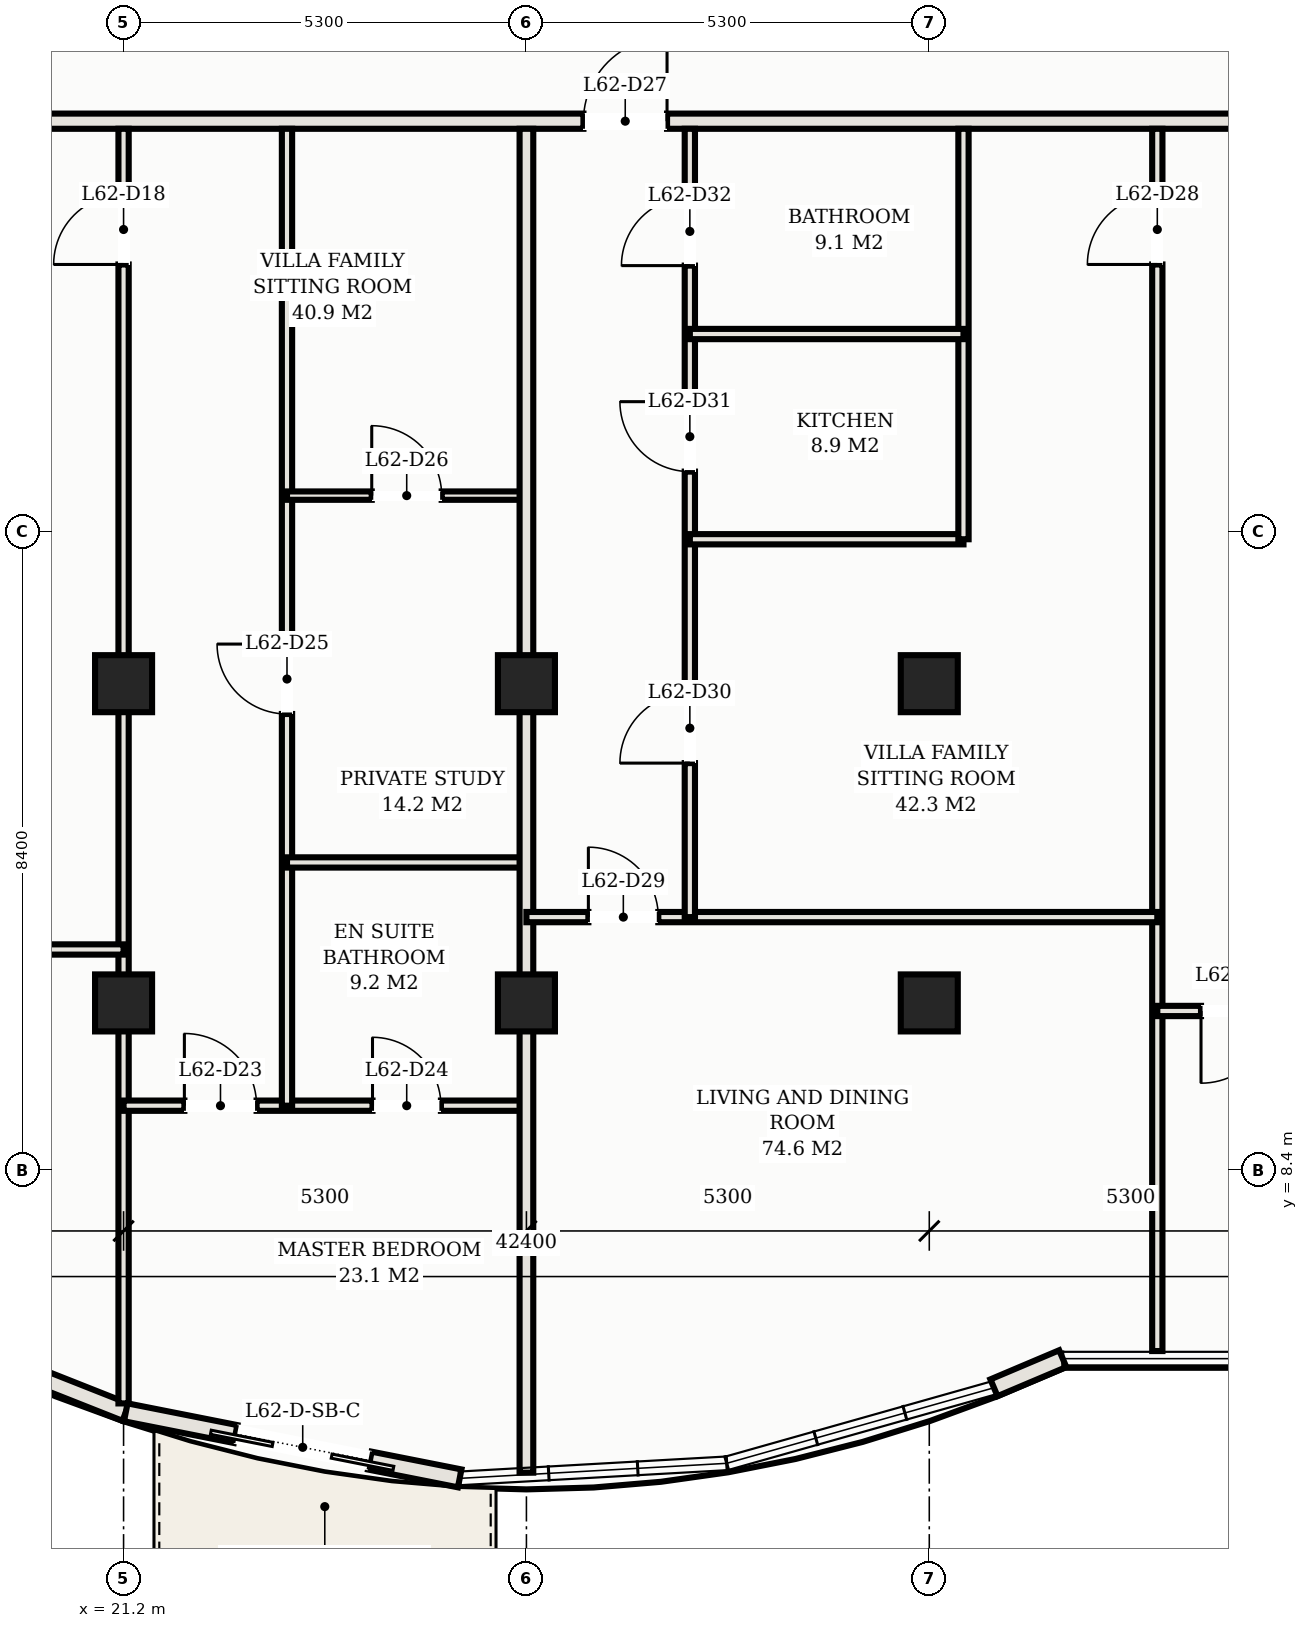
"""IFC4 building model, lengths in metres.
Left out: names, types, materials, properties, quantities, classifications, styles, units other than length and angle.
Written with IfcOpenShell. Run it as: python <this file> out.ifc"""

import sys

from ifc_helpers import new_model, si_unit, direction, frame, frame_2d, origin, origin_2d, place, context, subcontext, project, spatial, rectangle, hollow_rectangle, extrude, element, fill, save


model = new_model("IFC4")
c1 = context("Model", 3, precision=1e-05, world=origin(), true_north=direction((0.0, 1.0)))
c2 = subcontext(c1, "Body", "Model", "MODEL_VIEW")
j1 = project(units=[si_unit("LENGTHUNIT", "METRE"), si_unit("PLANEANGLEUNIT", "RADIAN")], contexts=[c1])
p1 = place(None, origin())
s1 = spatial("IfcSite", under=j1, at=p1, CompositionType="ELEMENT")
p2 = place(p1, origin())
s2 = spatial("IfcBuilding", under=s1, at=p2, CompositionType="ELEMENT")
p3 = place(p2, frame((0.0, 0.0, 226.4)))
s3 = spatial("IfcBuildingStorey", under=s2, at=p3, CompositionType="ELEMENT", Elevation=226.4)
for number, where, z_axis, x_axis in (
    (1, (21.2, 14.8, 0.0), (0.0, 0.0, 1.0), (1.0, 0.0, 0.0)),
    (2, (21.2, 10.6, 0.0), (0.0, 0.0, 1.0), (1.0, 0.0, 0.0)),
    (3, (26.5, 14.8, 0.0), (0.0, 0.0, 1.0), (1.0, 0.0, 0.0)),
    (4, (26.5, 10.6, 0.0), (0.0, 0.0, 1.0), (1.0, 0.0, 0.0)),
    (5, (31.8, 14.8, 0.0), (0.0, 0.0, 1.0), (1.0, 0.0, 0.0)),
    (6, (31.8, 10.6, 0.0), (0.0, 0.0, 1.0), (1.0, 0.0, 0.0)),
):
    element("IfcColumn", number, at=place(p3, frame(where, z_axis=z_axis, x_axis=x_axis)), inside=s3, PredefinedType="COLUMN", context=c2, shape_type="SweptSolid", body=[
        extrude(hollow_rectangle(XDim=0.75, YDim=0.75, WallThickness=0.025, at=origin_2d()), origin(), (0.0, 0.0, 1.0), 3.3),
    ])
p4 = place(p3, frame((19.444, 5.92, 0.0), z_axis=(0.0, 0.0, 1.0), x_axis=(0.92993442177, -0.367725401906, 0.0)))
e7 = element("IfcWall", 7, at=p4, inside=s3, PredefinedType="SOLIDWALL", context=c2, shape_type="SweptSolid", body=[
    extrude(rectangle(XDim=1.919, YDim=0.24, at=frame_2d((0.96, 0.0))), origin(), (0.0, 0.0, 1.0), 3.11),
])
p5 = place(p3, frame((21.229, 5.214, 0.0), z_axis=(0.0, 0.0, 1.0), x_axis=(0.980985349685, -0.194081796425, 0.0)))
e8 = element("IfcWall", 8, at=p5, inside=s3, PredefinedType="SOLIDWALL", context=c2, shape_type="SweptSolid", body=[
    extrude(rectangle(XDim=4.478, YDim=0.24, at=frame_2d((2.239, 0.0))), origin(), (0.0, 0.0, 1.0), 3.11),
])
p6 = place(p5, frame((1.473, 0.0, 0.0)))
e9 = element("IfcOpeningElement", 9, at=p6, cuts=e8, PredefinedType="OPENING", context=c2, shape_type="SweptSolid", body=[
    extrude(rectangle(XDim=1.8, YDim=2.2, at=frame_2d((0.9, 1.1))), frame((0.0, 0.13, 0.0), z_axis=(0.0, -1.0, 0.0), x_axis=(1.0, 0.0, 0.0)), (0.0, 0.0, 1.0), 0.26),
])
p7 = place(p3, frame((32.651, 5.537, 0.0), z_axis=(0.0, 0.0, 1.0), x_axis=(0.920998109395, 0.389567044924, 0.0)))
e10 = element("IfcWall", 10, at=p7, inside=s3, PredefinedType="SOLIDWALL", context=c2, shape_type="SweptSolid", body=[
    extrude(rectangle(XDim=0.983, YDim=0.24, at=frame_2d((0.491, 0.0))), origin(), (0.0, 0.0, 1.0), 3.11),
])
p8 = place(p3, frame((6.72, 22.2, 0.0), z_axis=(0.0, 0.0, 1.0), x_axis=(1.0, 0.0, 0.0)))
e11 = element("IfcWall", 11, at=p8, inside=s3, PredefinedType="PARTITIONING", context=c2, shape_type="SweptSolid", body=[
    extrude(rectangle(XDim=39.56, YDim=0.2, at=frame_2d((19.78, 0.0))), origin(), (0.0, 0.0, 1.0), 2.43),
])
p9 = place(p8, frame((4.63, 0.0, 0.0)))
e12 = element("IfcOpeningElement", 12, at=p9, cuts=e11, PredefinedType="OPENING", context=c2, shape_type="SweptSolid", body=[
    extrude(rectangle(XDim=1.1, YDim=2.25, at=frame_2d((0.55, 1.125))), frame((0.0, 0.11, 0.0), z_axis=(0.0, -1.0, 0.0), x_axis=(1.0, 0.0, 0.0)), (0.0, 0.0, 1.0), 0.22),
])
p10 = place(p8, frame((20.53, 0.0, 0.0)))
e13 = element("IfcOpeningElement", 13, at=p10, cuts=e11, PredefinedType="OPENING", context=c2, shape_type="SweptSolid", body=[
    extrude(rectangle(XDim=1.1, YDim=2.25, at=frame_2d((0.55, 1.125))), frame((0.0, 0.11, 0.0), z_axis=(0.0, -1.0, 0.0), x_axis=(1.0, 0.0, 0.0)), (0.0, 0.0, 1.0), 0.22),
])
p11 = place(p8, frame((1.435, 0.0, 0.0)))
e14 = element("IfcOpeningElement", 14, at=p11, cuts=e11, PredefinedType="OPENING", context=c2, shape_type="SweptSolid", body=[
    extrude(rectangle(XDim=0.92, YDim=2.15, at=frame_2d((0.46, 1.075))), frame((0.0, 0.11, 0.0), z_axis=(0.0, -1.0, 0.0), x_axis=(1.0, 0.0, 0.0)), (0.0, 0.0, 1.0), 0.22),
])
p12 = place(p8, frame((37.205, 0.0, 0.0)))
e15 = element("IfcOpeningElement", 15, at=p12, cuts=e11, PredefinedType="OPENING", context=c2, shape_type="SweptSolid", body=[
    extrude(rectangle(XDim=0.92, YDim=2.15, at=frame_2d((0.46, 1.075))), frame((0.0, 0.11, 0.0), z_axis=(0.0, -1.0, 0.0), x_axis=(1.0, 0.0, 0.0)), (0.0, 0.0, 1.0), 0.22),
])
p13 = place(p3, frame((21.2, 5.331, 0.0), z_axis=(0.0, 0.0, 1.0), x_axis=(0.0, 1.0, 0.0)))
e16 = element("IfcWall", 16, at=p13, inside=s3, PredefinedType="PARTITIONING", context=c2, shape_type="SweptSolid", body=[
    extrude(rectangle(XDim=16.769, YDim=0.135, at=frame_2d((8.385, 0.0))), origin(), (0.0, 0.0, 1.0), 2.43),
])
p14 = place(p13, frame((14.984, 0.0, 0.0)))
e17 = element("IfcOpeningElement", 17, at=p14, cuts=e16, PredefinedType="OPENING", context=c2, shape_type="SweptSolid", body=[
    extrude(rectangle(XDim=0.92, YDim=2.15, at=frame_2d((0.46, 1.075))), frame((0.0, 0.078, 0.0), z_axis=(0.0, -1.0, 0.0), x_axis=(1.0, 0.0, 0.0)), (0.0, 0.0, 1.0), 0.155),
])
p15 = place(p3, frame((10.6, 11.303, 0.0), z_axis=(0.0, 0.0, 1.0), x_axis=(1.0, 0.0, 0.0)))
e18 = element("IfcWall", 18, at=p15, inside=s3, PredefinedType="PARTITIONING", context=c2, shape_type="SweptSolid", body=[
    extrude(rectangle(XDim=10.6, YDim=0.135, at=frame_2d((5.3, 0.0))), origin(), (0.0, 0.0, 1.0), 2.43),
])
p16 = place(p15, frame((0.815, 0.0, 0.0)))
e19 = element("IfcOpeningElement", 19, at=p16, cuts=e18, PredefinedType="OPENING", context=c2, shape_type="SweptSolid", body=[
    extrude(rectangle(XDim=0.92, YDim=2.15, at=frame_2d((0.46, 1.075))), frame((0.0, 0.078, 0.0), z_axis=(0.0, -1.0, 0.0), x_axis=(1.0, 0.0, 0.0)), (0.0, 0.0, 1.0), 0.155),
])
p17 = place(p3, frame((21.2, 9.248, 0.0), z_axis=(0.0, 0.0, 1.0), x_axis=(1.0, 0.0, 0.0)))
e20 = element("IfcWall", 20, at=p17, inside=s3, PredefinedType="PARTITIONING", context=c2, shape_type="SweptSolid", body=[
    extrude(rectangle(XDim=5.3, YDim=0.135, at=frame_2d((2.65, 0.0))), origin(), (0.0, 0.0, 1.0), 2.43),
])
p18 = place(p17, frame((0.8, 0.0, 0.0)))
e21 = element("IfcOpeningElement", 21, at=p18, cuts=e20, PredefinedType="OPENING", context=c2, shape_type="SweptSolid", body=[
    extrude(rectangle(XDim=0.95, YDim=2.15, at=frame_2d((0.475, 1.075))), frame((0.0, 0.078, 0.0), z_axis=(0.0, -1.0, 0.0), x_axis=(1.0, 0.0, 0.0)), (0.0, 0.0, 1.0), 0.155),
])
p19 = place(p17, frame((3.275, 0.0, 0.0)))
e22 = element("IfcOpeningElement", 22, at=p19, cuts=e20, PredefinedType="OPENING", context=c2, shape_type="SweptSolid", body=[
    extrude(rectangle(XDim=0.9, YDim=2.15, at=frame_2d((0.45, 1.075))), frame((0.0, 0.078, 0.0), z_axis=(0.0, -1.0, 0.0), x_axis=(1.0, 0.0, 0.0)), (0.0, 0.0, 1.0), 0.155),
])
p20 = place(p3, frame((23.35, 9.248, 0.0), z_axis=(0.0, 0.0, 1.0), x_axis=(0.0, 1.0, 0.0)))
e23 = element("IfcWall", 23, at=p20, inside=s3, PredefinedType="PARTITIONING", context=c2, shape_type="SweptSolid", body=[
    extrude(rectangle(XDim=12.852, YDim=0.135, at=frame_2d((6.426, 0.0))), origin(), (0.0, 0.0, 1.0), 2.43),
])
p21 = place(p20, frame((5.153, 0.0, 0.0)))
e24 = element("IfcOpeningElement", 24, at=p21, cuts=e23, PredefinedType="OPENING", context=c2, shape_type="SweptSolid", body=[
    extrude(rectangle(XDim=0.92, YDim=2.15, at=frame_2d((0.46, 1.075))), frame((0.0, 0.078, 0.0), z_axis=(0.0, -1.0, 0.0), x_axis=(1.0, 0.0, 0.0)), (0.0, 0.0, 1.0), 0.155),
])
p22 = place(p3, frame((23.35, 12.448, 0.0), z_axis=(0.0, 0.0, 1.0), x_axis=(1.0, 0.0, 0.0)))
e25 = element("IfcWall", 25, at=p22, inside=s3, PredefinedType="PARTITIONING", context=c2, shape_type="SweptSolid", body=[
    extrude(rectangle(XDim=3.15, YDim=0.135, at=frame_2d((1.575, 0.0))), origin(), (0.0, 0.0, 1.0), 2.43),
])
p23 = place(p3, frame((23.35, 17.274, 0.0), z_axis=(0.0, 0.0, 1.0), x_axis=(1.0, 0.0, 0.0)))
e26 = element("IfcWall", 26, at=p23, inside=s3, PredefinedType="MOVABLE", context=c2, shape_type="SweptSolid", body=[
    extrude(rectangle(XDim=3.15, YDim=0.11, at=frame_2d((1.575, 0.0))), origin(), (0.0, 0.0, 1.0), 2.43),
])
p24 = place(p23, frame((1.115, 0.0, 0.0)))
e27 = element("IfcOpeningElement", 27, at=p24, cuts=e26, PredefinedType="OPENING", context=c2, shape_type="SweptSolid", body=[
    extrude(rectangle(XDim=0.92, YDim=2.15, at=frame_2d((0.46, 1.075))), frame((0.0, 0.065, 0.0), z_axis=(0.0, -1.0, 0.0), x_axis=(1.0, 0.0, 0.0)), (0.0, 0.0, 1.0), 0.13),
])
p25 = place(p3, frame((26.5, 4.42, 0.0), z_axis=(0.0, 0.0, 1.0), x_axis=(0.0, 1.0, 0.0)))
e28 = element("IfcWall", 28, at=p25, inside=s3, PredefinedType="PARTITIONING", context=c2, shape_type="SweptSolid", body=[
    extrude(rectangle(XDim=17.68, YDim=0.18, at=frame_2d((8.84, 0.0))), origin(), (0.0, 0.0, 1.0), 2.43),
])
p26 = place(p3, frame((34.8, 6.02, 0.0), z_axis=(0.0, 0.0, 1.0), x_axis=(0.0, 1.0, 0.0)))
e29 = element("IfcWall", 29, at=p26, inside=s3, PredefinedType="PARTITIONING", context=c2, shape_type="SweptSolid", body=[
    extrude(rectangle(XDim=16.08, YDim=0.135, at=frame_2d((8.04, 0.0))), origin(), (0.0, 0.0, 1.0), 2.43),
])
p27 = place(p26, frame((14.295, 0.0, 0.0)))
e30 = element("IfcOpeningElement", 30, at=p27, cuts=e29, PredefinedType="OPENING", context=c2, shape_type="SweptSolid", body=[
    extrude(rectangle(XDim=0.92, YDim=2.15, at=frame_2d((0.46, 1.075))), frame((0.0, 0.078, 0.0), z_axis=(0.0, -1.0, 0.0), x_axis=(1.0, 0.0, 0.0)), (0.0, 0.0, 1.0), 0.155),
])
p28 = place(p3, frame((26.5, 11.729, 0.0), z_axis=(0.0, 0.0, 1.0), x_axis=(1.0, 0.0, 0.0)))
e31 = element("IfcWall", 31, at=p28, inside=s3, PredefinedType="PARTITIONING", context=c2, shape_type="SweptSolid", body=[
    extrude(rectangle(XDim=8.3, YDim=0.135, at=frame_2d((4.15, 0.0))), origin(), (0.0, 0.0, 1.0), 2.43),
])
p29 = place(p28, frame((0.815, 0.0, 0.0)))
e32 = element("IfcOpeningElement", 32, at=p29, cuts=e31, PredefinedType="OPENING", context=c2, shape_type="SweptSolid", body=[
    extrude(rectangle(XDim=0.92, YDim=2.15, at=frame_2d((0.46, 1.075))), frame((0.0, 0.078, 0.0), z_axis=(0.0, -1.0, 0.0), x_axis=(1.0, 0.0, 0.0)), (0.0, 0.0, 1.0), 0.155),
])
p30 = place(p3, frame((28.65, 11.729, 0.0), z_axis=(0.0, 0.0, 1.0), x_axis=(0.0, 1.0, 0.0)))
e33 = element("IfcWall", 33, at=p30, inside=s3, PredefinedType="PARTITIONING", context=c2, shape_type="SweptSolid", body=[
    extrude(rectangle(XDim=10.371, YDim=0.135, at=frame_2d((5.186, 0.0))), origin(), (0.0, 0.0, 1.0), 2.43),
])
p31 = place(p30, frame((2.026, 0.0, 0.0)))
e34 = element("IfcOpeningElement", 34, at=p31, cuts=e33, PredefinedType="OPENING", context=c2, shape_type="SweptSolid", body=[
    extrude(rectangle(XDim=0.92, YDim=2.15, at=frame_2d((0.46, 1.075))), frame((0.0, 0.078, 0.0), z_axis=(0.0, -1.0, 0.0), x_axis=(1.0, 0.0, 0.0)), (0.0, 0.0, 1.0), 0.155),
])
p32 = place(p30, frame((5.861, 0.0, 0.0)))
e35 = element("IfcOpeningElement", 35, at=p32, cuts=e33, PredefinedType="OPENING", context=c2, shape_type="SweptSolid", body=[
    extrude(rectangle(XDim=0.92, YDim=2.15, at=frame_2d((0.46, 1.075))), frame((0.0, 0.078, 0.0), z_axis=(0.0, -1.0, 0.0), x_axis=(1.0, 0.0, 0.0)), (0.0, 0.0, 1.0), 0.155),
])
p33 = place(p30, frame((8.571, 0.0, 0.0)))
e36 = element("IfcOpeningElement", 36, at=p33, cuts=e33, PredefinedType="OPENING", context=c2, shape_type="SweptSolid", body=[
    extrude(rectangle(XDim=0.9, YDim=2.15, at=frame_2d((0.45, 1.075))), frame((0.0, 0.078, 0.0), z_axis=(0.0, -1.0, 0.0), x_axis=(1.0, 0.0, 0.0)), (0.0, 0.0, 1.0), 0.155),
])
p34 = place(p3, frame((28.65, 16.7, 0.0), z_axis=(0.0, 0.0, 1.0), x_axis=(1.0, 0.0, 0.0)))
e37 = element("IfcWall", 37, at=p34, inside=s3, PredefinedType="PARTITIONING", context=c2, shape_type="SweptSolid", body=[
    extrude(rectangle(XDim=3.6, YDim=0.135, at=frame_2d((1.8, 0.0))), origin(), (0.0, 0.0, 1.0), 2.43),
])
p35 = place(p3, frame((32.25, 16.7, 0.0), z_axis=(0.0, 0.0, 1.0), x_axis=(0.0, 1.0, 0.0)))
e38 = element("IfcWall", 38, at=p35, inside=s3, PredefinedType="PARTITIONING", context=c2, shape_type="SweptSolid", body=[
    extrude(rectangle(XDim=5.4, YDim=0.135, at=frame_2d((2.7, 0.0))), origin(), (0.0, 0.0, 1.0), 2.43),
])
p36 = place(p3, frame((28.65, 19.4, 0.0), z_axis=(0.0, 0.0, 1.0), x_axis=(1.0, 0.0, 0.0)))
e39 = element("IfcWall", 39, at=p36, inside=s3, PredefinedType="PARTITIONING", context=c2, shape_type="SweptSolid", body=[
    extrude(rectangle(XDim=3.6, YDim=0.135, at=frame_2d((1.8, 0.0))), origin(), (0.0, 0.0, 1.0), 2.43),
])
p37 = place(p3, frame((34.8, 10.494, 0.0), z_axis=(0.0, 0.0, 1.0), x_axis=(1.0, 0.0, 0.0)))
e40 = element("IfcWall", 40, at=p37, inside=s3, PredefinedType="PARTITIONING", context=c2, shape_type="SweptSolid", body=[
    extrude(rectangle(XDim=7.6, YDim=0.135, at=frame_2d((3.8, 0.0))), origin(), (0.0, 0.0, 1.0), 2.43),
])
p38 = place(p37, frame((0.575, 0.0, 0.0)))
e41 = element("IfcOpeningElement", 41, at=p38, cuts=e40, PredefinedType="OPENING", context=c2, shape_type="SweptSolid", body=[
    extrude(rectangle(XDim=0.95, YDim=2.15, at=frame_2d((0.475, 1.075))), frame((0.0, 0.078, 0.0), z_axis=(0.0, -1.0, 0.0), x_axis=(1.0, 0.0, 0.0)), (0.0, 0.0, 1.0), 0.155),
])
p39 = place(p37, frame((4.95, 0.0, 0.0)))
e42 = element("IfcOpeningElement", 42, at=p39, cuts=e40, PredefinedType="OPENING", context=c2, shape_type="SweptSolid", body=[
    extrude(rectangle(XDim=0.9, YDim=2.15, at=frame_2d((0.45, 1.075))), frame((0.0, 0.078, 0.0), z_axis=(0.0, -1.0, 0.0), x_axis=(1.0, 0.0, 0.0)), (0.0, 0.0, 1.0), 0.155),
])
p40 = place(p6, frame((1.8, 0.0, 0.0), z_axis=(0.0, 0.0, 1.0), x_axis=(-1.0, 0.0, 0.0)))
e43 = element("IfcDoor", 43, at=p40, inside=s3, OperationType="DOUBLE_DOOR_SLIDING", PredefinedType="DOOR", context=c2, shape_type="SweptSolid", body=[
    extrude(rectangle(XDim=1.8, YDim=2.2, at=frame_2d((0.9, 1.1))), frame((0.0, 0.025, 0.0), z_axis=(0.0, -1.0, 0.0), x_axis=(1.0, 0.0, 0.0)), (0.0, 0.0, 1.0), 0.05),
])
fill(e9, e43)
p41 = place(p14, origin())
e44 = element("IfcDoor", 44, at=p41, inside=s3, OperationType="SINGLE_SWING_LEFT", PredefinedType="DOOR", context=c2, shape_type="SweptSolid", body=[
    extrude(rectangle(XDim=0.92, YDim=2.15, at=frame_2d((0.46, 1.075))), frame((0.0, 0.025, 0.0), z_axis=(0.0, -1.0, 0.0), x_axis=(1.0, 0.0, 0.0)), (0.0, 0.0, 1.0), 0.05),
])
fill(e17, e44)
p42 = place(p18, origin())
e45 = element("IfcDoor", 45, at=p42, inside=s3, OperationType="SINGLE_SWING_LEFT", PredefinedType="DOOR", context=c2, shape_type="SweptSolid", body=[
    extrude(rectangle(XDim=0.95, YDim=2.15, at=frame_2d((0.475, 1.075))), frame((0.0, 0.025, 0.0), z_axis=(0.0, -1.0, 0.0), x_axis=(1.0, 0.0, 0.0)), (0.0, 0.0, 1.0), 0.05),
])
fill(e21, e45)
p43 = place(p19, origin())
e46 = element("IfcDoor", 46, at=p43, inside=s3, OperationType="SINGLE_SWING_LEFT", PredefinedType="DOOR", context=c2, shape_type="SweptSolid", body=[
    extrude(rectangle(XDim=0.9, YDim=2.15, at=frame_2d((0.45, 1.075))), frame((0.0, 0.025, 0.0), z_axis=(0.0, -1.0, 0.0), x_axis=(1.0, 0.0, 0.0)), (0.0, 0.0, 1.0), 0.05),
])
fill(e22, e46)
p44 = place(p21, origin())
e47 = element("IfcDoor", 47, at=p44, inside=s3, OperationType="SINGLE_SWING_RIGHT", PredefinedType="DOOR", context=c2, shape_type="SweptSolid", body=[
    extrude(rectangle(XDim=0.92, YDim=2.15, at=frame_2d((0.46, 1.075))), frame((0.0, 0.025, 0.0), z_axis=(0.0, -1.0, 0.0), x_axis=(1.0, 0.0, 0.0)), (0.0, 0.0, 1.0), 0.05),
])
fill(e24, e47)
p45 = place(p24, origin())
e48 = element("IfcDoor", 48, at=p45, inside=s3, OperationType="SINGLE_SWING_LEFT", PredefinedType="DOOR", context=c2, shape_type="SweptSolid", body=[
    extrude(rectangle(XDim=0.92, YDim=2.15, at=frame_2d((0.46, 1.075))), frame((0.0, 0.025, 0.0), z_axis=(0.0, -1.0, 0.0), x_axis=(1.0, 0.0, 0.0)), (0.0, 0.0, 1.0), 0.05),
])
fill(e27, e48)
p46 = place(p10, origin())
e49 = element("IfcDoor", 49, at=p46, inside=s3, OperationType="SINGLE_SWING_RIGHT", PredefinedType="DOOR", context=c2, shape_type="SweptSolid", body=[
    extrude(rectangle(XDim=1.1, YDim=2.25, at=frame_2d((0.55, 1.125))), frame((0.0, 0.025, 0.0), z_axis=(0.0, -1.0, 0.0), x_axis=(1.0, 0.0, 0.0)), (0.0, 0.0, 1.0), 0.05),
])
fill(e13, e49)
p47 = place(p27, origin())
e50 = element("IfcDoor", 50, at=p47, inside=s3, OperationType="SINGLE_SWING_LEFT", PredefinedType="DOOR", context=c2, shape_type="SweptSolid", body=[
    extrude(rectangle(XDim=0.92, YDim=2.15, at=frame_2d((0.46, 1.075))), frame((0.0, 0.025, 0.0), z_axis=(0.0, -1.0, 0.0), x_axis=(1.0, 0.0, 0.0)), (0.0, 0.0, 1.0), 0.05),
])
fill(e30, e50)
p48 = place(p29, origin())
e51 = element("IfcDoor", 51, at=p48, inside=s3, OperationType="SINGLE_SWING_LEFT", PredefinedType="DOOR", context=c2, shape_type="SweptSolid", body=[
    extrude(rectangle(XDim=0.92, YDim=2.15, at=frame_2d((0.46, 1.075))), frame((0.0, 0.025, 0.0), z_axis=(0.0, -1.0, 0.0), x_axis=(1.0, 0.0, 0.0)), (0.0, 0.0, 1.0), 0.05),
])
fill(e32, e51)
p49 = place(p31, origin())
e52 = element("IfcDoor", 52, at=p49, inside=s3, OperationType="SINGLE_SWING_LEFT", PredefinedType="DOOR", context=c2, shape_type="SweptSolid", body=[
    extrude(rectangle(XDim=0.92, YDim=2.15, at=frame_2d((0.46, 1.075))), frame((0.0, 0.025, 0.0), z_axis=(0.0, -1.0, 0.0), x_axis=(1.0, 0.0, 0.0)), (0.0, 0.0, 1.0), 0.05),
])
fill(e34, e52)
p50 = place(p32, origin())
e53 = element("IfcDoor", 53, at=p50, inside=s3, OperationType="SINGLE_SWING_RIGHT", PredefinedType="DOOR", context=c2, shape_type="SweptSolid", body=[
    extrude(rectangle(XDim=0.92, YDim=2.15, at=frame_2d((0.46, 1.075))), frame((0.0, 0.025, 0.0), z_axis=(0.0, -1.0, 0.0), x_axis=(1.0, 0.0, 0.0)), (0.0, 0.0, 1.0), 0.05),
])
fill(e35, e53)
p51 = place(p33, origin())
e54 = element("IfcDoor", 54, at=p51, inside=s3, OperationType="SINGLE_SWING_LEFT", PredefinedType="DOOR", context=c2, shape_type="SweptSolid", body=[
    extrude(rectangle(XDim=0.9, YDim=2.15, at=frame_2d((0.45, 1.075))), frame((0.0, 0.025, 0.0), z_axis=(0.0, -1.0, 0.0), x_axis=(1.0, 0.0, 0.0)), (0.0, 0.0, 1.0), 0.05),
])
fill(e36, e54)
p52 = place(p38, frame((0.95, 0.0, 0.0), z_axis=(0.0, 0.0, 1.0), x_axis=(-1.0, 0.0, 0.0)))
e55 = element("IfcDoor", 55, at=p52, inside=s3, OperationType="SINGLE_SWING_RIGHT", PredefinedType="DOOR", context=c2, shape_type="SweptSolid", body=[
    extrude(rectangle(XDim=0.95, YDim=2.15, at=frame_2d((0.475, 1.075))), frame((0.0, 0.025, 0.0), z_axis=(0.0, -1.0, 0.0), x_axis=(1.0, 0.0, 0.0)), (0.0, 0.0, 1.0), 0.05),
])
fill(e41, e55)
save(model, sys.argv[1])
